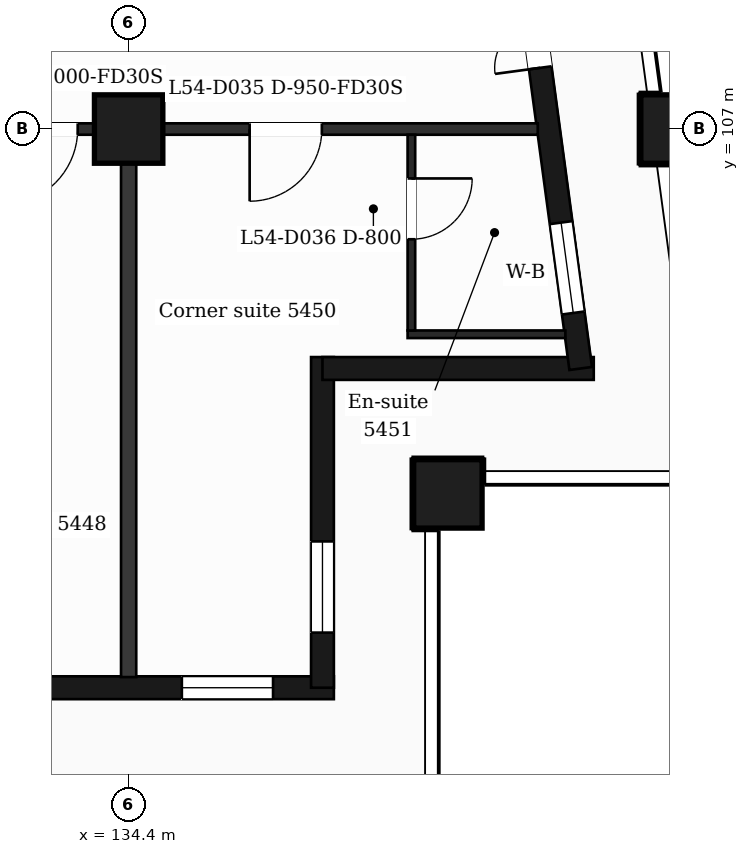
"""IFC4 building model, lengths in metres.
Left out: names, types, materials, properties, quantities, classifications, styles, units other than length and angle.
Written with IfcOpenShell. Run it as: python <this file> out.ifc"""

import sys

from ifc_helpers import new_model, si_unit, direction, frame, frame_2d, origin, origin_2d, place, context, subcontext, project, spatial, rectangle, extrude, element, fill, save


model = new_model("IFC4")
c1 = context("Model", 3, precision=1e-05, world=origin(), true_north=direction((0.0, 1.0)))
c2 = subcontext(c1, "Body", "Model", "MODEL_VIEW")
j1 = project(units=[si_unit("LENGTHUNIT", "METRE"), si_unit("PLANEANGLEUNIT", "RADIAN")], contexts=[c1])
p1 = place(None, origin())
s1 = spatial("IfcSite", under=j1, at=p1, CompositionType="ELEMENT")
p2 = place(p1, origin())
s2 = spatial("IfcBuilding", under=s1, at=p2, CompositionType="ELEMENT")
p3 = place(p2, frame((0.0, 0.0, 224.4)))
s3 = spatial("IfcBuildingStorey", under=s2, at=p3, CompositionType="ELEMENT", Elevation=224.4)
for number, where, z_axis, x_axis in (
    (1, (138.6, 102.2, 0.0), (0.0, 0.0, 1.0), (1.0, 0.0, 0.0)),
    (2, (134.4, 107.0, 0.0), (0.0, 0.0, 1.0), (1.0, 0.0, 0.0)),
    (3, (141.588, 107.0, 0.0), (0.0, 0.0, 1.0), (1.0, 0.0, 0.0)),
):
    element("IfcColumn", number, at=place(p3, frame(where, z_axis=z_axis, x_axis=x_axis)), inside=s3, PredefinedType="COLUMN", context=c2, shape_type="SweptSolid", body=[
        extrude(rectangle(XDim=0.9, YDim=0.9, at=origin_2d()), origin(), (0.0, 0.0, 1.0), 3.7),
    ])
p4 = place(p3, frame((89.85, 99.65, 0.0), z_axis=(0.0, 0.0, 1.0), x_axis=(1.0, 0.0, 0.0)))
e4 = element("IfcWall", 4, at=p4, inside=s3, PredefinedType="SOLIDWALL", context=c2, shape_type="SweptSolid", body=[
    extrude(rectangle(XDim=47.25, YDim=0.3, at=frame_2d((23.625, 0.0))), origin(), (0.0, 0.0, 1.0), 3.38),
])
p5 = place(p4, frame((0.725, 0.0, 0.9)))
e5 = element("IfcOpeningElement", 5, at=p5, cuts=e4, PredefinedType="OPENING", context=c2, shape_type="SweptSolid", body=[
    extrude(rectangle(XDim=1.2, YDim=2.1, at=frame_2d((0.6, 1.05))), frame((0.0, 0.16, 0.0), z_axis=(0.0, -1.0, 0.0), x_axis=(1.0, 0.0, 0.0)), (0.0, 0.0, 1.0), 0.32),
])
p6 = place(p4, frame((3.45, 0.0, 0.9)))
e6 = element("IfcOpeningElement", 6, at=p6, cuts=e4, PredefinedType="OPENING", context=c2, shape_type="SweptSolid", body=[
    extrude(rectangle(XDim=2.4, YDim=2.1, at=frame_2d((1.2, 1.05))), frame((0.0, 0.16, 0.0), z_axis=(0.0, -1.0, 0.0), x_axis=(1.0, 0.0, 0.0)), (0.0, 0.0, 1.0), 0.32),
])
p7 = place(p4, frame((8.25, 0.0, 0.9)))
e7 = element("IfcOpeningElement", 7, at=p7, cuts=e4, PredefinedType="OPENING", context=c2, shape_type="SweptSolid", body=[
    extrude(rectangle(XDim=1.2, YDim=2.1, at=frame_2d((0.6, 1.05))), frame((0.0, 0.16, 0.0), z_axis=(0.0, -1.0, 0.0), x_axis=(1.0, 0.0, 0.0)), (0.0, 0.0, 1.0), 0.32),
])
p8 = place(p4, frame((12.45, 0.0, 0.9)))
e8 = element("IfcOpeningElement", 8, at=p8, cuts=e4, PredefinedType="OPENING", context=c2, shape_type="SweptSolid", body=[
    extrude(rectangle(XDim=1.2, YDim=2.1, at=frame_2d((0.6, 1.05))), frame((0.0, 0.16, 0.0), z_axis=(0.0, -1.0, 0.0), x_axis=(1.0, 0.0, 0.0)), (0.0, 0.0, 1.0), 0.32),
])
p9 = place(p4, frame((16.05, 0.0, 0.9)))
e9 = element("IfcOpeningElement", 9, at=p9, cuts=e4, PredefinedType="OPENING", context=c2, shape_type="SweptSolid", body=[
    extrude(rectangle(XDim=2.4, YDim=2.1, at=frame_2d((1.2, 1.05))), frame((0.0, 0.16, 0.0), z_axis=(0.0, -1.0, 0.0), x_axis=(1.0, 0.0, 0.0)), (0.0, 0.0, 1.0), 0.32),
])
p10 = place(p4, frame((20.25, 0.0, 0.9)))
e10 = element("IfcOpeningElement", 10, at=p10, cuts=e4, PredefinedType="OPENING", context=c2, shape_type="SweptSolid", body=[
    extrude(rectangle(XDim=2.4, YDim=2.1, at=frame_2d((1.2, 1.05))), frame((0.0, 0.16, 0.0), z_axis=(0.0, -1.0, 0.0), x_axis=(1.0, 0.0, 0.0)), (0.0, 0.0, 1.0), 0.32),
])
p11 = place(p4, frame((25.05, 0.0, 0.0)))
e11 = element("IfcOpeningElement", 11, at=p11, cuts=e4, PredefinedType="OPENING", context=c2, shape_type="SweptSolid", body=[
    extrude(rectangle(XDim=1.2, YDim=2.4, at=frame_2d((0.6, 1.2))), frame((0.0, 0.16, 0.0), z_axis=(0.0, -1.0, 0.0), x_axis=(1.0, 0.0, 0.0)), (0.0, 0.0, 1.0), 0.32),
])
p12 = place(p4, frame((28.65, 0.0, 0.9)))
e12 = element("IfcOpeningElement", 12, at=p12, cuts=e4, PredefinedType="OPENING", context=c2, shape_type="SweptSolid", body=[
    extrude(rectangle(XDim=2.4, YDim=2.1, at=frame_2d((1.2, 1.05))), frame((0.0, 0.16, 0.0), z_axis=(0.0, -1.0, 0.0), x_axis=(1.0, 0.0, 0.0)), (0.0, 0.0, 1.0), 0.32),
])
p13 = place(p4, frame((32.85, 0.0, 0.9)))
e13 = element("IfcOpeningElement", 13, at=p13, cuts=e4, PredefinedType="OPENING", context=c2, shape_type="SweptSolid", body=[
    extrude(rectangle(XDim=2.4, YDim=2.1, at=frame_2d((1.2, 1.05))), frame((0.0, 0.16, 0.0), z_axis=(0.0, -1.0, 0.0), x_axis=(1.0, 0.0, 0.0)), (0.0, 0.0, 1.0), 0.32),
])
p14 = place(p4, frame((37.65, 0.0, 0.9)))
e14 = element("IfcOpeningElement", 14, at=p14, cuts=e4, PredefinedType="OPENING", context=c2, shape_type="SweptSolid", body=[
    extrude(rectangle(XDim=1.2, YDim=2.1, at=frame_2d((0.6, 1.05))), frame((0.0, 0.16, 0.0), z_axis=(0.0, -1.0, 0.0), x_axis=(1.0, 0.0, 0.0)), (0.0, 0.0, 1.0), 0.32),
])
p15 = place(p4, frame((41.85, 0.0, 0.9)))
e15 = element("IfcOpeningElement", 15, at=p15, cuts=e4, PredefinedType="OPENING", context=c2, shape_type="SweptSolid", body=[
    extrude(rectangle(XDim=1.2, YDim=2.1, at=frame_2d((0.6, 1.05))), frame((0.0, 0.16, 0.0), z_axis=(0.0, -1.0, 0.0), x_axis=(1.0, 0.0, 0.0)), (0.0, 0.0, 1.0), 0.32),
])
p16 = place(p4, frame((45.25, 0.0, 0.9)))
e16 = element("IfcOpeningElement", 16, at=p16, cuts=e4, PredefinedType="OPENING", context=c2, shape_type="SweptSolid", body=[
    extrude(rectangle(XDim=1.2, YDim=2.1, at=frame_2d((0.6, 1.05))), frame((0.0, 0.16, 0.0), z_axis=(0.0, -1.0, 0.0), x_axis=(1.0, 0.0, 0.0)), (0.0, 0.0, 1.0), 0.32),
])
p17 = place(p3, frame((136.95, 99.65, 0.0), z_axis=(0.0, 0.0, 1.0), x_axis=(0.0, 1.0, 0.0)))
e17 = element("IfcWall", 17, at=p17, inside=s3, PredefinedType="SOLIDWALL", context=c2, shape_type="SweptSolid", body=[
    extrude(rectangle(XDim=4.35, YDim=0.3, at=frame_2d((2.175, 0.0))), origin(), (0.0, 0.0, 1.0), 3.38),
])
p18 = place(p17, frame((0.725, 0.0, 0.9)))
e18 = element("IfcOpeningElement", 18, at=p18, cuts=e17, PredefinedType="OPENING", context=c2, shape_type="SweptSolid", body=[
    extrude(rectangle(XDim=1.2, YDim=2.1, at=frame_2d((0.6, 1.05))), frame((0.0, 0.16, 0.0), z_axis=(0.0, -1.0, 0.0), x_axis=(1.0, 0.0, 0.0)), (0.0, 0.0, 1.0), 0.32),
])
p19 = place(p3, frame((136.95, 103.85, 0.0), z_axis=(0.0, 0.0, 1.0), x_axis=(1.0, 0.0, 0.0)))
e19 = element("IfcWall", 19, at=p19, inside=s3, PredefinedType="SOLIDWALL", context=c2, shape_type="SweptSolid", body=[
    extrude(rectangle(XDim=3.569, YDim=0.3, at=frame_2d((1.785, 0.0))), origin(), (0.0, 0.0, 1.0), 3.38),
])
p20 = place(p3, frame((140.348, 103.85, 0.0), z_axis=(0.0, 0.0, 1.0), x_axis=(-0.133431549479, 0.991058031401, 0.0)))
e20 = element("IfcWall", 20, at=p20, inside=s3, PredefinedType="SOLIDWALL", context=c2, shape_type="SweptSolid", body=[
    extrude(rectangle(XDim=6.609, YDim=0.3, at=frame_2d((3.304, 0.0))), origin(), (0.0, 0.0, 1.0), 3.38),
])
p21 = place(p20, frame((0.737, 0.0, 0.9)))
e21 = element("IfcOpeningElement", 21, at=p21, cuts=e20, PredefinedType="OPENING", context=c2, shape_type="SweptSolid", body=[
    extrude(rectangle(XDim=1.2, YDim=2.1, at=frame_2d((0.6, 1.05))), frame((0.0, 0.16, 0.0), z_axis=(0.0, -1.0, 0.0), x_axis=(1.0, 0.0, 0.0)), (0.0, 0.0, 1.0), 0.32),
])
p22 = place(p20, frame((3.991, 0.0, 0.0)))
e22 = element("IfcOpeningElement", 22, at=p22, cuts=e20, PredefinedType="OPENING", context=c2, shape_type="SweptSolid", body=[
    extrude(rectangle(XDim=1.2, YDim=2.4, at=frame_2d((0.6, 1.2))), frame((0.0, 0.16, 0.0), z_axis=(0.0, -1.0, 0.0), x_axis=(1.0, 0.0, 0.0)), (0.0, 0.0, 1.0), 0.32),
])
p23 = place(p3, frame((138.07, 104.3, 0.0), z_axis=(0.0, 0.0, 1.0), x_axis=(1.0, 0.0, 0.0)))
e23 = element("IfcWall", 23, at=p23, inside=s3, PredefinedType="PARTITIONING", context=c2, shape_type="SweptSolid", body=[
    extrude(rectangle(XDim=2.076, YDim=0.1, at=frame_2d((1.038, 0.0))), origin(), (0.0, 0.0, 1.0), 3.38),
])
p24 = place(p3, frame((87.018, 107.0, 0.0), z_axis=(0.0, 0.0, 1.0), x_axis=(1.0, 0.0, 0.0)))
e24 = element("IfcWall", 24, at=p24, inside=s3, PredefinedType="PARTITIONING", context=c2, shape_type="SweptSolid", body=[
    extrude(rectangle(XDim=52.765, YDim=0.15, at=frame_2d((26.382, 0.0))), origin(), (0.0, 0.0, 1.0), 3.38),
])
p25 = place(p24, frame((0.707, 0.0, 0.0)))
e25 = element("IfcOpeningElement", 25, at=p25, cuts=e24, PredefinedType="OPENING", context=c2, shape_type="SweptSolid", body=[
    extrude(rectangle(XDim=0.95, YDim=2.1, at=frame_2d((0.475, 1.05))), frame((0.0, 0.085, 0.0), z_axis=(0.0, -1.0, 0.0), x_axis=(1.0, 0.0, 0.0)), (0.0, 0.0, 1.0), 0.17),
])
p26 = place(p24, frame((6.894, 0.0, 0.0)))
e26 = element("IfcOpeningElement", 26, at=p26, cuts=e24, PredefinedType="OPENING", context=c2, shape_type="SweptSolid", body=[
    extrude(rectangle(XDim=0.95, YDim=2.1, at=frame_2d((0.475, 1.05))), frame((0.0, 0.085, 0.0), z_axis=(0.0, -1.0, 0.0), x_axis=(1.0, 0.0, 0.0)), (0.0, 0.0, 1.0), 0.17),
])
p27 = place(p24, frame((15.662, 0.0, 0.0)))
e27 = element("IfcOpeningElement", 27, at=p27, cuts=e24, PredefinedType="OPENING", context=c2, shape_type="SweptSolid", body=[
    extrude(rectangle(XDim=0.95, YDim=2.1, at=frame_2d((0.475, 1.05))), frame((0.0, 0.085, 0.0), z_axis=(0.0, -1.0, 0.0), x_axis=(1.0, 0.0, 0.0)), (0.0, 0.0, 1.0), 0.17),
])
p28 = place(p24, frame((18.257, 0.0, 0.0)))
e28 = element("IfcOpeningElement", 28, at=p28, cuts=e24, PredefinedType="OPENING", context=c2, shape_type="SweptSolid", body=[
    extrude(rectangle(XDim=0.95, YDim=2.1, at=frame_2d((0.475, 1.05))), frame((0.0, 0.085, 0.0), z_axis=(0.0, -1.0, 0.0), x_axis=(1.0, 0.0, 0.0)), (0.0, 0.0, 1.0), 0.17),
])
p29 = place(p24, frame((28.607, 0.0, 0.0)))
e29 = element("IfcOpeningElement", 29, at=p29, cuts=e24, PredefinedType="OPENING", context=c2, shape_type="SweptSolid", body=[
    extrude(rectangle(XDim=1.0, YDim=2.1, at=frame_2d((0.5, 1.05))), frame((0.0, 0.085, 0.0), z_axis=(0.0, -1.0, 0.0), x_axis=(1.0, 0.0, 0.0)), (0.0, 0.0, 1.0), 0.17),
])
p30 = place(p24, frame((31.302, 0.0, 0.0)))
e30 = element("IfcOpeningElement", 30, at=p30, cuts=e24, PredefinedType="OPENING", context=c2, shape_type="SweptSolid", body=[
    extrude(rectangle(XDim=0.95, YDim=2.1, at=frame_2d((0.475, 1.05))), frame((0.0, 0.085, 0.0), z_axis=(0.0, -1.0, 0.0), x_axis=(1.0, 0.0, 0.0)), (0.0, 0.0, 1.0), 0.17),
])
p31 = place(p24, frame((35.057, 0.0, 0.0)))
e31 = element("IfcOpeningElement", 31, at=p31, cuts=e24, PredefinedType="OPENING", context=c2, shape_type="SweptSolid", body=[
    extrude(rectangle(XDim=0.95, YDim=2.1, at=frame_2d((0.475, 1.05))), frame((0.0, 0.085, 0.0), z_axis=(0.0, -1.0, 0.0), x_axis=(1.0, 0.0, 0.0)), (0.0, 0.0, 1.0), 0.17),
])
p32 = place(p24, frame((41.957, 0.0, 0.0)))
e32 = element("IfcOpeningElement", 32, at=p32, cuts=e24, PredefinedType="OPENING", context=c2, shape_type="SweptSolid", body=[
    extrude(rectangle(XDim=0.95, YDim=2.1, at=frame_2d((0.475, 1.05))), frame((0.0, 0.085, 0.0), z_axis=(0.0, -1.0, 0.0), x_axis=(1.0, 0.0, 0.0)), (0.0, 0.0, 1.0), 0.17),
])
p33 = place(p24, frame((45.712, 0.0, 0.0)))
e33 = element("IfcOpeningElement", 33, at=p33, cuts=e24, PredefinedType="OPENING", context=c2, shape_type="SweptSolid", body=[
    extrude(rectangle(XDim=1.0, YDim=2.1, at=frame_2d((0.5, 1.05))), frame((0.0, 0.085, 0.0), z_axis=(0.0, -1.0, 0.0), x_axis=(1.0, 0.0, 0.0)), (0.0, 0.0, 1.0), 0.17),
])
p34 = place(p24, frame((48.974, 0.0, 0.0)))
e34 = element("IfcOpeningElement", 34, at=p34, cuts=e24, PredefinedType="OPENING", context=c2, shape_type="SweptSolid", body=[
    extrude(rectangle(XDim=0.95, YDim=2.1, at=frame_2d((0.475, 1.05))), frame((0.0, 0.085, 0.0), z_axis=(0.0, -1.0, 0.0), x_axis=(1.0, 0.0, 0.0)), (0.0, 0.0, 1.0), 0.17),
])
p35 = place(p3, frame((134.4, 99.79, 0.0), z_axis=(0.0, 0.0, 1.0), x_axis=(0.0, 1.0, 0.0)))
e35 = element("IfcWall", 35, at=p35, inside=s3, PredefinedType="PARTITIONING", context=c2, shape_type="SweptSolid", body=[
    extrude(rectangle(XDim=7.135, YDim=0.2, at=frame_2d((3.567, 0.0))), origin(), (0.0, 0.0, 1.0), 3.38),
])
p36 = place(p3, frame((138.12, 104.35, 0.0), z_axis=(0.0, 0.0, 1.0), x_axis=(0.0, 1.0, 0.0)))
e36 = element("IfcWall", 36, at=p36, inside=s3, PredefinedType="PARTITIONING", context=c2, shape_type="SweptSolid", body=[
    extrude(rectangle(XDim=2.575, YDim=0.1, at=frame_2d((1.288, 0.0))), origin(), (0.0, 0.0, 1.0), 3.38),
])
p37 = place(p36, frame((1.2, 0.0, 0.0)))
e37 = element("IfcOpeningElement", 37, at=p37, cuts=e36, PredefinedType="OPENING", context=c2, shape_type="SweptSolid", body=[
    extrude(rectangle(XDim=0.8, YDim=2.1, at=frame_2d((0.4, 1.05))), frame((0.0, 0.06, 0.0), z_axis=(0.0, -1.0, 0.0), x_axis=(1.0, 0.0, 0.0)), (0.0, 0.0, 1.0), 0.12),
])
p38 = place(p16, origin())
e38 = element("IfcWindow", 38, at=p38, inside=s3, PartitioningType="SINGLE_PANEL", PredefinedType="WINDOW", context=c2, shape_type="SweptSolid", body=[
    extrude(rectangle(XDim=1.2, YDim=2.1, at=frame_2d((0.6, 1.05))), frame((0.0, 0.03, 0.0), z_axis=(0.0, -1.0, 0.0), x_axis=(1.0, 0.0, 0.0)), (0.0, 0.0, 1.0), 0.06),
])
fill(e16, e38)
p39 = place(p18, origin())
e39 = element("IfcWindow", 39, at=p39, inside=s3, PartitioningType="SINGLE_PANEL", PredefinedType="WINDOW", context=c2, shape_type="SweptSolid", body=[
    extrude(rectangle(XDim=1.2, YDim=2.1, at=frame_2d((0.6, 1.05))), frame((0.0, 0.03, 0.0), z_axis=(0.0, -1.0, 0.0), x_axis=(1.0, 0.0, 0.0)), (0.0, 0.0, 1.0), 0.06),
])
fill(e18, e39)
p40 = place(p21, origin())
e40 = element("IfcWindow", 40, at=p40, inside=s3, PartitioningType="SINGLE_PANEL", PredefinedType="WINDOW", context=c2, shape_type="SweptSolid", body=[
    extrude(rectangle(XDim=1.2, YDim=2.1, at=frame_2d((0.6, 1.05))), frame((0.0, 0.03, 0.0), z_axis=(0.0, -1.0, 0.0), x_axis=(1.0, 0.0, 0.0)), (0.0, 0.0, 1.0), 0.06),
])
fill(e21, e40)
p41 = place(p22, origin())
e41 = element("IfcDoor", 41, at=p41, inside=s3, OperationType="DOUBLE_DOOR_SINGLE_SWING", PredefinedType="DOOR", context=c2, shape_type="SweptSolid", body=[
    extrude(rectangle(XDim=1.2, YDim=2.4, at=frame_2d((0.6, 1.2))), frame((0.0, 0.025, 0.0), z_axis=(0.0, -1.0, 0.0), x_axis=(1.0, 0.0, 0.0)), (0.0, 0.0, 1.0), 0.05),
])
fill(e22, e41)
p42 = place(p33, origin())
e42 = element("IfcDoor", 42, at=p42, inside=s3, OperationType="SINGLE_SWING_LEFT", PredefinedType="DOOR", context=c2, shape_type="SweptSolid", body=[
    extrude(rectangle(XDim=1.0, YDim=2.1, at=frame_2d((0.5, 1.05))), frame((0.0, 0.025, 0.0), z_axis=(0.0, -1.0, 0.0), x_axis=(1.0, 0.0, 0.0)), (0.0, 0.0, 1.0), 0.05),
])
fill(e33, e42)
p43 = place(p34, origin())
e43 = element("IfcDoor", 43, at=p43, inside=s3, OperationType="SINGLE_SWING_LEFT", PredefinedType="DOOR", context=c2, shape_type="SweptSolid", body=[
    extrude(rectangle(XDim=0.95, YDim=2.1, at=frame_2d((0.475, 1.05))), frame((0.0, 0.025, 0.0), z_axis=(0.0, -1.0, 0.0), x_axis=(1.0, 0.0, 0.0)), (0.0, 0.0, 1.0), 0.05),
])
fill(e34, e43)
p44 = place(p37, origin())
e44 = element("IfcDoor", 44, at=p44, inside=s3, OperationType="SINGLE_SWING_RIGHT", PredefinedType="DOOR", context=c2, shape_type="SweptSolid", body=[
    extrude(rectangle(XDim=0.8, YDim=2.1, at=frame_2d((0.4, 1.05))), frame((0.0, 0.025, 0.0), z_axis=(0.0, -1.0, 0.0), x_axis=(1.0, 0.0, 0.0)), (0.0, 0.0, 1.0), 0.05),
])
fill(e37, e44)
save(model, sys.argv[1])
